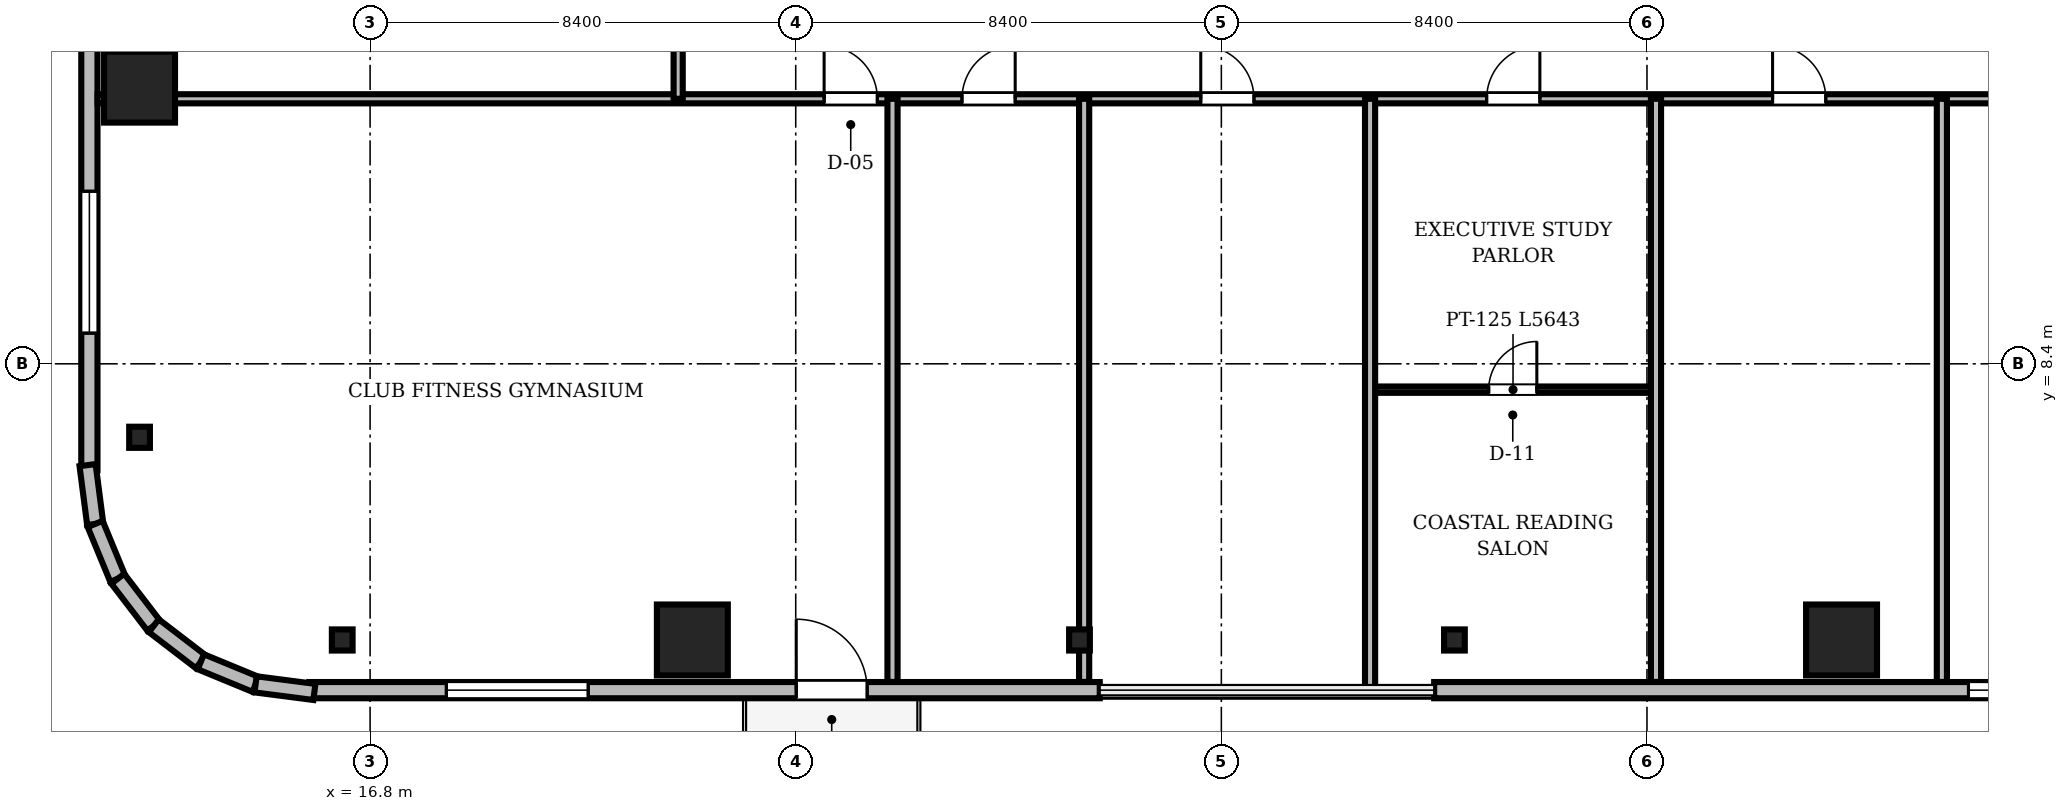
"""IFC4 building model, lengths in metres.
Left out: names, types, materials, properties, quantities, classifications, styles, units other than length and angle.
Written with IfcOpenShell. Run it as: python <this file> out.ifc"""

import sys

from ifc_helpers import new_model, si_unit, direction, frame, frame_2d, origin, origin_2d, place, context, subcontext, project, spatial, rectangle, i_section, extrude, source, transform, mapped, element, fill, save


model = new_model("IFC4")
c1 = context("Model", 3, precision=1e-05, world=origin(), true_north=direction((0.0, 1.0)))
c2 = subcontext(c1, "Body", "Model", "MODEL_VIEW")
j1 = project(units=[si_unit("LENGTHUNIT", "METRE"), si_unit("PLANEANGLEUNIT", "RADIAN")], contexts=[c1])
p1 = place(None, origin())
s1 = spatial("IfcSite", under=j1, at=p1, CompositionType="ELEMENT")
p2 = place(p1, origin())
s2 = spatial("IfcBuilding", under=s1, at=p2, CompositionType="ELEMENT")
p3 = place(p2, frame((0.0, 0.0, 226.05)))
s3 = spatial("IfcBuildingStorey", under=s2, at=p3, CompositionType="ELEMENT", Elevation=226.05)
m1 = source(origin(), c2, "Body", "SweptSolid", [
    extrude(rectangle(XDim=1.4, YDim=1.4, at=origin_2d()), origin(), (0.0, 0.0, 1.0), 3.53),
])
for number, where, z_axis, x_axis in (
    (1, (23.16, 2.95, 0.0), (0.0, 0.0, 1.0), (1.0, 0.0, 0.0)),
    (2, (45.84, 2.95, 0.0), (0.0, 0.0, 1.0), (1.0, 0.0, 0.0)),
    (3, (12.25, 13.86, 0.0), (0.0, 0.0, 1.0), (1.0, 0.0, 0.0)),
):
    element("IfcColumn", number, at=place(p3, frame(where, z_axis=z_axis, x_axis=x_axis)), inside=s3, PredefinedType="COLUMN", context=c2, shape_type="MappedRepresentation", body=[
        mapped(m1, transform((0.0, 0.0, 0.0), scale=1.0)),
    ])
m2 = source(origin(), c2, "Body", "SweptSolid", [
    extrude(i_section(OverallWidth=0.409, OverallDepth=0.417, WebThickness=0.021, FlangeThickness=0.033, FilletRadius=0.015, at=origin_2d()), origin(), (0.0, 0.0, 1.0), 3.53),
])
for number, where, z_axis, x_axis in (
    (4, (16.25, 2.95, 0.0), (0.0, 0.0, 1.0), (1.0, 0.0, 0.0)),
    (5, (30.8, 2.95, 0.0), (0.0, 0.0, 1.0), (1.0, 0.0, 0.0)),
    (6, (38.2, 2.95, 0.0), (0.0, 0.0, 1.0), (1.0, 0.0, 0.0)),
    (7, (12.25, 6.95, 0.0), (0.0, 0.0, 1.0), (1.0, 0.0, 0.0)),
):
    element("IfcColumn", number, at=place(p3, frame(where, z_axis=z_axis, x_axis=x_axis)), inside=s3, PredefinedType="COLUMN", context=c2, shape_type="MappedRepresentation", body=[
        mapped(m2, transform((0.0, 0.0, 0.0), scale=1.0)),
    ])
m3 = source(origin(), c2, "Body", "SweptSolid", [
    extrude(rectangle(XDim=15.6, YDim=0.32, at=frame_2d((7.8, 0.0))), origin(), (0.0, 0.0, 1.0), 3.53),
])
p4 = place(p3, frame((15.6, 1.96, 0.0), z_axis=(0.0, 0.0, 1.0), x_axis=(1.0, 0.0, 0.0)))
e8 = element("IfcWall", 8, at=p4, inside=s3, PredefinedType="SOLIDWALL", context=c2, shape_type="MappedRepresentation", body=[
    mapped(m3, transform((0.0, 0.0, 0.0), scale=1.0)),
])
m4 = source(origin(), c2, "Body", "SweptSolid", [
    extrude(rectangle(XDim=1.4, YDim=2.3, at=frame_2d((0.7, 1.15))), frame((0.0, 0.17, 0.0), z_axis=(0.0, -1.0, 0.0), x_axis=(1.0, 0.0, 0.0)), (0.0, 0.0, 1.0), 0.34),
])
p5 = place(p4, frame((9.61, 0.0, 0.0)))
e9 = element("IfcOpeningElement", 9, at=p5, cuts=e8, PredefinedType="OPENING", context=c2, shape_type="MappedRepresentation", body=[
    mapped(m4, transform((0.0, 0.0, 0.0), scale=1.0)),
])
m5 = source(origin(), c2, "Body", "SweptSolid", [
    extrude(rectangle(XDim=2.8, YDim=2.4, at=frame_2d((1.4, 1.2))), frame((0.0, 0.17, 0.0), z_axis=(0.0, -1.0, 0.0), x_axis=(1.0, 0.0, 0.0)), (0.0, 0.0, 1.0), 0.34),
])
p6 = place(p4, frame((2.705, 0.0, 0.72)))
e10 = element("IfcOpeningElement", 10, at=p6, cuts=e8, PredefinedType="OPENING", context=c2, shape_type="MappedRepresentation", body=[
    mapped(m5, transform((0.0, 0.0, 0.0), scale=1.0)),
])
p7 = place(p3, frame((37.8, 1.96, 0.0), z_axis=(0.0, 0.0, 1.0), x_axis=(1.0, 0.0, 0.0)))
e11 = element("IfcWall", 11, at=p7, inside=s3, PredefinedType="SOLIDWALL", context=c2, shape_type="MappedRepresentation", body=[
    mapped(m3, transform((0.0, 0.0, 0.0), scale=1.0)),
])
p8 = place(p7, frame((10.545, 0.0, 0.72)))
e12 = element("IfcOpeningElement", 12, at=p8, cuts=e11, PredefinedType="OPENING", context=c2, shape_type="MappedRepresentation", body=[
    mapped(m5, transform((0.0, 0.0, 0.0), scale=1.0)),
])
p9 = place(p3, frame((11.26, 21.9, 0.0), z_axis=(0.0, 0.0, 1.0), x_axis=(0.0, -1.0, 0.0)))
e13 = element("IfcWall", 13, at=p9, inside=s3, PredefinedType="SOLIDWALL", context=c2, shape_type="MappedRepresentation", body=[
    mapped(m3, transform((0.0, 0.0, 0.0), scale=1.0)),
])
p10 = place(p9, frame((10.095, 0.0, 0.72)))
e14 = element("IfcOpeningElement", 14, at=p10, cuts=e13, PredefinedType="OPENING", context=c2, shape_type="MappedRepresentation", body=[
    mapped(m5, transform((0.0, 0.0, 0.0), scale=1.0)),
])
m6 = source(origin(), c2, "Body", "SweptSolid", [
    extrude(rectangle(XDim=1.171, YDim=0.32, at=frame_2d((0.585, 0.0))), origin(), (0.0, 0.0, 1.0), 3.53),
])
p11 = place(p3, frame((11.224, 6.401, 0.0), z_axis=(0.0, 0.0, 1.0), x_axis=(0.128269133229, -0.991739395941, 0.0)))
e15 = element("IfcWall", 15, at=p11, inside=s3, PredefinedType="SOLIDWALL", context=c2, shape_type="MappedRepresentation", body=[
    mapped(m6, transform((0.0, 0.0, 0.0), scale=1.0)),
])
m7 = source(origin(), c2, "Body", "SweptSolid", [
    extrude(rectangle(XDim=1.169, YDim=0.32, at=frame_2d((0.584, 0.0))), origin(), (0.0, 0.0, 1.0), 3.53),
])
for number, where, z_axis, x_axis in (
    (16, (11.375, 5.24, 0.0), (0.0, 0.0, 1.0), (0.381, -0.925, 0.0)),
    (17, (11.82, 4.159, 0.0), (0.0, 0.0, 1.0), (0.608, -0.794, 0.0)),
):
    element("IfcWall", number, at=place(p3, frame(where, z_axis=z_axis, x_axis=x_axis)), inside=s3, PredefinedType="SOLIDWALL", context=c2, shape_type="MappedRepresentation", body=[
        mapped(m7, transform((0.0, 0.0, 0.0), scale=1.0)),
    ])
m8 = source(origin(), c2, "Body", "SweptSolid", [
    extrude(rectangle(XDim=1.169, YDim=0.32, at=frame_2d((0.584, 0.0))), origin(), (0.0, 0.0, 1.0), 3.53),
])
p12 = place(p3, frame((12.531, 3.231, 0.0), z_axis=(0.0, 0.0, 1.0), x_axis=(0.793663520347, -0.608356981114, 0.0)))
e18 = element("IfcWall", 18, at=p12, inside=s3, PredefinedType="SOLIDWALL", context=c2, shape_type="MappedRepresentation", body=[
    mapped(m8, transform((0.0, 0.0, 0.0), scale=1.0)),
])
m9 = source(origin(), c2, "Body", "SweptSolid", [
    extrude(rectangle(XDim=1.169, YDim=0.32, at=frame_2d((0.585, 0.0))), origin(), (0.0, 0.0, 1.0), 3.53),
])
p13 = place(p3, frame((13.459, 2.52, 0.0), z_axis=(0.0, 0.0, 1.0), x_axis=(0.924479075121, -0.381232789334, 0.0)))
e19 = element("IfcWall", 19, at=p13, inside=s3, PredefinedType="SOLIDWALL", context=c2, shape_type="MappedRepresentation", body=[
    mapped(m9, transform((0.0, 0.0, 0.0), scale=1.0)),
])
m10 = source(origin(), c2, "Body", "SweptSolid", [
    extrude(rectangle(XDim=1.17, YDim=0.32, at=frame_2d((0.585, 0.0))), origin(), (0.0, 0.0, 1.0), 3.53),
])
p14 = place(p3, frame((14.54, 2.074, 0.0), z_axis=(0.0, 0.0, 1.0), x_axis=(0.991762485493, -0.128090485085, 0.0)))
e20 = element("IfcWall", 20, at=p14, inside=s3, PredefinedType="SOLIDWALL", context=c2, shape_type="MappedRepresentation", body=[
    mapped(m10, transform((0.0, 0.0, 0.0), scale=1.0)),
])
m11 = source(origin(), c2, "Body", "SweptSolid", [
    extrude(rectangle(XDim=46.156, YDim=0.18, at=frame_2d((23.078, 0.0))), origin(), (0.0, 0.0, 1.0), 2.772),
])
p15 = place(p3, frame((11.422, 13.63, 0.0), z_axis=(0.0, 0.0, 1.0), x_axis=(1.0, 0.0, 0.0)))
e21 = element("IfcWall", 21, at=p15, inside=s3, PredefinedType="PARTITIONING", context=c2, shape_type="MappedRepresentation", body=[
    mapped(m11, transform((0.0, 0.0, 0.0), scale=1.0)),
])
m12 = source(origin(), c2, "Body", "SweptSolid", [
    extrude(rectangle(XDim=1.05, YDim=2.2, at=frame_2d((0.525, 1.1))), frame((0.0, 0.1, 0.0), z_axis=(0.0, -1.0, 0.0), x_axis=(1.0, 0.0, 0.0)), (0.0, 0.0, 1.0), 0.2),
])
p16 = place(p15, frame((14.338, 0.0, 0.0)))
e22 = element("IfcOpeningElement", 22, at=p16, cuts=e21, PredefinedType="OPENING", context=c2, shape_type="MappedRepresentation", body=[
    mapped(m12, transform((0.0, 0.0, 0.0), scale=1.0)),
])
p17 = place(p15, frame((17.059, 0.0, 0.0)))
e23 = element("IfcOpeningElement", 23, at=p17, cuts=e21, PredefinedType="OPENING", context=c2, shape_type="MappedRepresentation", body=[
    mapped(m12, transform((0.0, 0.0, 0.0), scale=1.0)),
])
p18 = place(p15, frame((21.772, 0.0, 0.0)))
e24 = element("IfcOpeningElement", 24, at=p18, cuts=e21, PredefinedType="OPENING", context=c2, shape_type="MappedRepresentation", body=[
    mapped(m12, transform((0.0, 0.0, 0.0), scale=1.0)),
])
p19 = place(p15, frame((27.414, 0.0, 0.0)))
e25 = element("IfcOpeningElement", 25, at=p19, cuts=e21, PredefinedType="OPENING", context=c2, shape_type="MappedRepresentation", body=[
    mapped(m12, transform((0.0, 0.0, 0.0), scale=1.0)),
])
p20 = place(p15, frame((33.057, 0.0, 0.0)))
e26 = element("IfcOpeningElement", 26, at=p20, cuts=e21, PredefinedType="OPENING", context=c2, shape_type="MappedRepresentation", body=[
    mapped(m12, transform((0.0, 0.0, 0.0), scale=1.0)),
])
p21 = place(p15, frame((37.498, 0.0, 0.0)))
e27 = element("IfcOpeningElement", 27, at=p21, cuts=e21, PredefinedType="OPENING", context=c2, shape_type="MappedRepresentation", body=[
    mapped(m12, transform((0.0, 0.0, 0.0), scale=1.0)),
])
m13 = source(origin(), c2, "Body", "SweptSolid", [
    extrude(rectangle(XDim=5.643, YDim=0.125, at=frame_2d((2.822, 0.0))), origin(), (0.0, 0.0, 1.0), 2.972),
])
p22 = place(p3, frame((36.535, 7.89, 0.0), z_axis=(0.0, 0.0, 1.0), x_axis=(1.0, 0.0, 0.0)))
e28 = element("IfcWall", 28, at=p22, inside=s3, PredefinedType="PARTITIONING", context=c2, shape_type="MappedRepresentation", body=[
    mapped(m13, transform((0.0, 0.0, 0.0), scale=1.0)),
])
m14 = source(origin(), c2, "Body", "SweptSolid", [
    extrude(rectangle(XDim=0.95, YDim=2.15, at=frame_2d((0.475, 1.075))), frame((0.0, 0.073, 0.0), z_axis=(0.0, -1.0, 0.0), x_axis=(1.0, 0.0, 0.0)), (0.0, 0.0, 1.0), 0.145),
])
p23 = place(p22, frame((2.341, 0.0, 0.0)))
e29 = element("IfcOpeningElement", 29, at=p23, cuts=e28, PredefinedType="OPENING", context=c2, shape_type="MappedRepresentation", body=[
    mapped(m14, transform((0.0, 0.0, 0.0), scale=1.0)),
])
m15 = source(origin(), c2, "Body", "SweptSolid", [
    extrude(rectangle(XDim=14.92, YDim=0.18, at=frame_2d((7.46, 0.0))), origin(), (0.0, 0.0, 1.0), 2.972),
])
p24 = place(p3, frame((22.88, 13.63, 0.0), z_axis=(0.0, 0.0, 1.0), x_axis=(0.0, 1.0, 0.0)))
e30 = element("IfcWall", 30, at=p24, inside=s3, PredefinedType="PARTITIONING", context=c2, shape_type="MappedRepresentation", body=[
    mapped(m15, transform((0.0, 0.0, 0.0), scale=1.0)),
])
m16 = source(origin(), c2, "Body", "SweptSolid", [
    extrude(rectangle(XDim=11.508, YDim=0.2, at=frame_2d((5.754, 0.0))), origin(), (0.0, 0.0, 1.0), 2.772),
])
for number, where, z_axis, x_axis in (
    (31, (27.11, 2.122, 0.0), (0.0, 0.0, 1.0), (0.0, 1.0, 0.0)),
    (32, (30.892, 2.122, 0.0), (0.0, 0.0, 1.0), (0.0, 1.0, 0.0)),
):
    element("IfcWall", number, at=place(p3, frame(where, z_axis=z_axis, x_axis=x_axis)), inside=s3, PredefinedType="PARTITIONING", context=c2, shape_type="MappedRepresentation", body=[
        mapped(m16, transform((0.0, 0.0, 0.0), scale=1.0)),
    ])
m17 = source(origin(), c2, "Body", "SweptSolid", [
    extrude(rectangle(XDim=11.7, YDim=0.2, at=frame_2d((5.85, 0.0))), origin(), (0.0, 0.0, 1.0), 2.772),
])
p25 = place(p3, frame((36.535, 1.93, 0.0), z_axis=(0.0, 0.0, 1.0), x_axis=(0.0, 1.0, 0.0)))
e33 = element("IfcWall", 33, at=p25, inside=s3, PredefinedType="PARTITIONING", context=c2, shape_type="MappedRepresentation", body=[
    mapped(m17, transform((0.0, 0.0, 0.0), scale=1.0)),
])
for number, where, z_axis, x_axis in (
    (34, (42.178, 2.122, 0.0), (0.0, 0.0, 1.0), (0.0, 1.0, 0.0)),
    (35, (47.82, 2.122, 0.0), (0.0, 0.0, 1.0), (0.0, 1.0, 0.0)),
):
    element("IfcWall", number, at=place(p3, frame(where, z_axis=z_axis, x_axis=x_axis)), inside=s3, PredefinedType="PARTITIONING", context=c2, shape_type="MappedRepresentation", body=[
        mapped(m16, transform((0.0, 0.0, 0.0), scale=1.0)),
    ])
m18 = source(origin(), c2, "Body", "SweptSolid", [
    extrude(rectangle(XDim=1.4, YDim=2.3, at=frame_2d((0.7, 1.15))), frame((0.0, 0.025, 0.0), z_axis=(0.0, -1.0, 0.0), x_axis=(1.0, 0.0, 0.0)), (0.0, 0.0, 1.0), 0.05),
])
p26 = place(p5, frame((1.4, 0.0, 0.0), z_axis=(0.0, 0.0, 1.0), x_axis=(-1.0, 0.0, 0.0)))
e36 = element("IfcDoor", 36, at=p26, inside=s3, OperationType="DOUBLE_DOOR_SLIDING", PredefinedType="DOOR", context=c2, shape_type="MappedRepresentation", body=[
    mapped(m18, transform((0.0, 0.0, 0.0), scale=1.0)),
])
fill(e9, e36)
m19 = source(origin(), c2, "Body", "SweptSolid", [
    extrude(rectangle(XDim=2.8, YDim=2.4, at=frame_2d((1.4, 1.2))), frame((0.0, 0.03, 0.0), z_axis=(0.0, -1.0, 0.0), x_axis=(1.0, 0.0, 0.0)), (0.0, 0.0, 1.0), 0.06),
])
p27 = place(p6, origin())
e37 = element("IfcWindow", 37, at=p27, inside=s3, PartitioningType="SINGLE_PANEL", PredefinedType="WINDOW", context=c2, shape_type="MappedRepresentation", body=[
    mapped(m19, transform((0.0, 0.0, 0.0), scale=1.0)),
])
fill(e10, e37)
p28 = place(p8, origin())
e38 = element("IfcWindow", 38, at=p28, inside=s3, PartitioningType="SINGLE_PANEL", PredefinedType="WINDOW", context=c2, shape_type="MappedRepresentation", body=[
    mapped(m19, transform((0.0, 0.0, 0.0), scale=1.0)),
])
fill(e12, e38)
p29 = place(p10, origin())
e39 = element("IfcWindow", 39, at=p29, inside=s3, PartitioningType="SINGLE_PANEL", PredefinedType="WINDOW", context=c2, shape_type="MappedRepresentation", body=[
    mapped(m19, transform((0.0, 0.0, 0.0), scale=1.0)),
])
fill(e14, e39)
m20 = source(origin(), c2, "Body", "SweptSolid", [
    extrude(rectangle(XDim=1.05, YDim=2.2, at=frame_2d((0.525, 1.1))), frame((0.0, 0.025, 0.0), z_axis=(0.0, -1.0, 0.0), x_axis=(1.0, 0.0, 0.0)), (0.0, 0.0, 1.0), 0.05),
])
p30 = place(p16, origin())
e40 = element("IfcDoor", 40, at=p30, inside=s3, OperationType="SINGLE_SWING_LEFT", PredefinedType="DOOR", context=c2, shape_type="MappedRepresentation", body=[
    mapped(m20, transform((0.0, 0.0, 0.0), scale=1.0)),
])
fill(e22, e40)
p31 = place(p17, origin())
e41 = element("IfcDoor", 41, at=p31, inside=s3, OperationType="SINGLE_SWING_RIGHT", PredefinedType="DOOR", context=c2, shape_type="MappedRepresentation", body=[
    mapped(m20, transform((0.0, 0.0, 0.0), scale=1.0)),
])
fill(e23, e41)
p32 = place(p18, origin())
e42 = element("IfcDoor", 42, at=p32, inside=s3, OperationType="SINGLE_SWING_LEFT", PredefinedType="DOOR", context=c2, shape_type="MappedRepresentation", body=[
    mapped(m20, transform((0.0, 0.0, 0.0), scale=1.0)),
])
fill(e24, e42)
p33 = place(p19, origin())
e43 = element("IfcDoor", 43, at=p33, inside=s3, OperationType="SINGLE_SWING_RIGHT", PredefinedType="DOOR", context=c2, shape_type="MappedRepresentation", body=[
    mapped(m20, transform((0.0, 0.0, 0.0), scale=1.0)),
])
fill(e25, e43)
p34 = place(p20, origin())
e44 = element("IfcDoor", 44, at=p34, inside=s3, OperationType="SINGLE_SWING_LEFT", PredefinedType="DOOR", context=c2, shape_type="MappedRepresentation", body=[
    mapped(m20, transform((0.0, 0.0, 0.0), scale=1.0)),
])
fill(e26, e44)
m21 = source(origin(), c2, "Body", "SweptSolid", [
    extrude(rectangle(XDim=0.95, YDim=2.15, at=frame_2d((0.475, 1.075))), frame((0.0, 0.025, 0.0), z_axis=(0.0, -1.0, 0.0), x_axis=(1.0, 0.0, 0.0)), (0.0, 0.0, 1.0), 0.05),
])
p35 = place(p23, origin())
e45 = element("IfcDoor", 45, at=p35, inside=s3, OperationType="SINGLE_SWING_RIGHT", PredefinedType="DOOR", context=c2, shape_type="MappedRepresentation", body=[
    mapped(m21, transform((0.0, 0.0, 0.0), scale=1.0)),
])
fill(e29, e45)
save(model, sys.argv[1])
